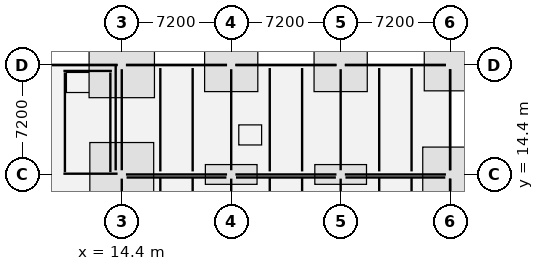
"""IFC4 building model, lengths in metres.
Left out: names, types, materials, properties, quantities, classifications, styles, units other than length and angle.
Written with IfcOpenShell. Run it as: python <this file> out.ifc"""

import sys

from ifc_helpers import new_model, si_unit, direction, frame, frame_2d, origin, origin_2d, place, context, subcontext, project, spatial, rectangle, extrude, element, fill, save


model = new_model("IFC4")
c1 = context("Model", 3, precision=1e-05, world=origin(), true_north=direction((0.0, 1.0)))
c2 = subcontext(c1, "Body", "Model", "MODEL_VIEW")
j1 = project(units=[si_unit("LENGTHUNIT", "METRE"), si_unit("PLANEANGLEUNIT", "RADIAN")], contexts=[c1])
p1 = place(None, origin())
s1 = spatial("IfcSite", under=j1, at=p1, CompositionType="ELEMENT")
p2 = place(p1, origin())
s2 = spatial("IfcBuilding", under=s1, at=p2, CompositionType="ELEMENT")
p3 = place(p2, origin())
s3 = spatial("IfcBuildingStorey", under=s2, at=p3, CompositionType="ELEMENT", Elevation=0.0)
for number, where, z_axis, x_axis in (
    (1, (14.4, 14.4, 0.0), (0.0, 0.0, 1.0), (1.0, 0.0, 0.0)),
    (2, (14.4, 21.6, 0.0), (0.0, 0.0, 1.0), (1.0, 0.0, 0.0)),
    (3, (21.6, 14.4, 0.0), (0.0, 0.0, 1.0), (1.0, 0.0, 0.0)),
    (4, (21.6, 21.6, 0.0), (0.0, 0.0, 1.0), (1.0, 0.0, 0.0)),
    (5, (28.8, 14.4, 0.0), (0.0, 0.0, 1.0), (1.0, 0.0, 0.0)),
    (6, (28.8, 21.6, 0.0), (0.0, 0.0, 1.0), (1.0, 0.0, 0.0)),
    (7, (36.0, 14.4, 0.0), (0.0, 0.0, 1.0), (1.0, 0.0, 0.0)),
    (8, (36.0, 21.6, 0.0), (0.0, 0.0, 1.0), (1.0, 0.0, 0.0)),
):
    element("IfcColumn", number, at=place(p3, frame(where, z_axis=z_axis, x_axis=x_axis)), inside=s3, PredefinedType="COLUMN", context=c2, shape_type="SweptSolid", body=[
        extrude(rectangle(XDim=0.55, YDim=0.55, at=origin_2d()), origin(), (0.0, 0.0, 1.0), 5.4),
    ])
p4 = place(p3, frame((10.56, 14.45, 0.0), z_axis=(0.0, 0.0, 1.0), x_axis=(1.0, 0.0, 0.0)))
e9 = element("IfcWall", 9, at=p4, inside=s3, PredefinedType="SHEAR", context=c2, shape_type="SweptSolid", body=[
    extrude(rectangle(XDim=3.565, YDim=0.2, at=frame_2d((1.782, 0.0))), origin(), (0.0, 0.0, 1.0), 5.15),
])
p5 = place(p4, frame((1.232, 0.0, 0.0)))
e10 = element("IfcOpeningElement", 10, at=p5, cuts=e9, PredefinedType="OPENING", context=c2, shape_type="SweptSolid", body=[
    extrude(rectangle(XDim=1.1, YDim=2.15, at=frame_2d((0.55, 1.075))), frame((0.0, 0.112, 0.0), z_axis=(0.0, -1.0, 0.0), x_axis=(1.0, 0.0, 0.0)), (0.0, 0.0, 1.0), 0.224),
])
p6 = place(p3, frame((10.56, 21.21, 0.0), z_axis=(0.0, 0.0, 1.0), x_axis=(1.0, 0.0, 0.0)))
e11 = element("IfcWall", 11, at=p6, inside=s3, PredefinedType="SHEAR", context=c2, shape_type="SweptSolid", body=[
    extrude(rectangle(XDim=3.19, YDim=0.2, at=frame_2d((1.595, 0.0))), origin(), (0.0, 0.0, 1.0), 5.15),
])
for number, where, z_axis, x_axis in (
    (12, (10.66, 14.55, 0.0), (0.0, 0.0, 1.0), (0.0, 1.0, 0.0)),
    (13, (13.65, 14.55, 0.0), (0.0, 0.0, 1.0), (0.0, 1.0, 0.0)),
):
    element("IfcWall", number, at=place(p3, frame(where, z_axis=z_axis, x_axis=x_axis)), inside=s3, PredefinedType="SHEAR", context=c2, shape_type="SweptSolid", body=[
        extrude(rectangle(XDim=6.56, YDim=0.2, at=frame_2d((3.28, 0.0))), origin(), (0.0, 0.0, 1.0), 5.15),
    ])
p7 = place(p3, frame((36.0, 14.675, 0.0), z_axis=(0.0, 0.0, 1.0), x_axis=(0.0, 1.0, 0.0)))
e14 = element("IfcWall", 14, at=p7, inside=s3, PredefinedType="SOLIDWALL", context=c2, shape_type="SweptSolid", body=[
    extrude(rectangle(XDim=6.65, YDim=0.36, at=frame_2d((3.325, 0.0))), origin(), (0.0, 0.0, 1.0), 4.49),
])
p8 = place(p7, frame((2.325, 0.0, 0.0)))
e15 = element("IfcOpeningElement", 15, at=p8, cuts=e14, PredefinedType="OPENING", context=c2, shape_type="SweptSolid", body=[
    extrude(rectangle(XDim=2.0, YDim=2.3, at=frame_2d((1.0, 1.15))), frame((0.0, 0.192, 0.0), z_axis=(0.0, -1.0, 0.0), x_axis=(1.0, 0.0, 0.0)), (0.0, 0.0, 1.0), 0.384),
])
p9 = place(p3, frame((35.725, 21.6, 0.0), z_axis=(0.0, 0.0, 1.0), x_axis=(-1.0, 0.0, 0.0)))
e16 = element("IfcWall", 16, at=p9, inside=s3, PredefinedType="SOLIDWALL", context=c2, shape_type="SweptSolid", body=[
    extrude(rectangle(XDim=6.65, YDim=0.36, at=frame_2d((3.325, 0.0))), origin(), (0.0, 0.0, 1.0), 4.39),
])
p10 = place(p9, frame((2.425, 0.0, 0.85)))
e17 = element("IfcOpeningElement", 17, at=p10, cuts=e16, PredefinedType="OPENING", context=c2, shape_type="SweptSolid", body=[
    extrude(rectangle(XDim=1.8, YDim=2.2, at=frame_2d((0.9, 1.1))), frame((0.0, 0.192, 0.0), z_axis=(0.0, -1.0, 0.0), x_axis=(1.0, 0.0, 0.0)), (0.0, 0.0, 1.0), 0.384),
])
p11 = place(p3, frame((28.525, 21.6, 0.0), z_axis=(0.0, 0.0, 1.0), x_axis=(-1.0, 0.0, 0.0)))
e18 = element("IfcWall", 18, at=p11, inside=s3, PredefinedType="SOLIDWALL", context=c2, shape_type="SweptSolid", body=[
    extrude(rectangle(XDim=6.65, YDim=0.36, at=frame_2d((3.325, 0.0))), origin(), (0.0, 0.0, 1.0), 4.44),
])
p12 = place(p11, frame((2.875, 0.0, 0.85)))
e19 = element("IfcOpeningElement", 19, at=p12, cuts=e18, PredefinedType="OPENING", context=c2, shape_type="SweptSolid", body=[
    extrude(rectangle(XDim=0.9, YDim=2.0, at=frame_2d((0.45, 1.0))), frame((0.0, 0.192, 0.0), z_axis=(0.0, -1.0, 0.0), x_axis=(1.0, 0.0, 0.0)), (0.0, 0.0, 1.0), 0.384),
])
p13 = place(p3, frame((21.325, 21.6, 0.0), z_axis=(0.0, 0.0, 1.0), x_axis=(-1.0, 0.0, 0.0)))
e20 = element("IfcWall", 20, at=p13, inside=s3, PredefinedType="SOLIDWALL", context=c2, shape_type="SweptSolid", body=[
    extrude(rectangle(XDim=6.65, YDim=0.36, at=frame_2d((3.325, 0.0))), origin(), (0.0, 0.0, 1.0), 4.39),
])
p14 = place(p13, frame((2.65, 0.0, 0.85)))
e21 = element("IfcOpeningElement", 21, at=p14, cuts=e20, PredefinedType="OPENING", context=c2, shape_type="SweptSolid", body=[
    extrude(rectangle(XDim=1.35, YDim=2.0, at=frame_2d((0.675, 1.0))), frame((0.0, 0.192, 0.0), z_axis=(0.0, -1.0, 0.0), x_axis=(1.0, 0.0, 0.0)), (0.0, 0.0, 1.0), 0.384),
])
p15 = place(p3, frame((11.0, 21.6, 0.0), z_axis=(0.0, 0.0, 1.0), x_axis=(-1.0, 0.0, 0.0)))
e22 = element("IfcWall", 22, at=p15, inside=s3, PredefinedType="SOLIDWALL", context=c2, shape_type="SweptSolid", body=[
    extrude(rectangle(XDim=0.4, YDim=0.36, at=frame_2d((0.2, 0.0))), origin(), (0.0, 0.0, 1.0), 4.44),
])
p16 = place(p3, frame((14.715, 14.2, 0.0), z_axis=(0.0, 0.0, 1.0), x_axis=(1.0, 0.0, 0.0)))
e23 = element("IfcWall", 23, at=p16, inside=s3, PredefinedType="PARTITIONING", context=c2, shape_type="SweptSolid", body=[
    extrude(rectangle(XDim=6.57, YDim=0.1, at=frame_2d((3.285, 0.0))), origin(), (0.0, 0.0, 1.0), 4.438),
])
p17 = place(p16, frame((2.535, 0.0, 0.0)))
e24 = element("IfcOpeningElement", 24, at=p17, cuts=e23, PredefinedType="OPENING", context=c2, shape_type="SweptSolid", body=[
    extrude(rectangle(XDim=1.5, YDim=2.2, at=frame_2d((0.75, 1.1))), frame((0.0, 0.062, 0.0), z_axis=(0.0, -1.0, 0.0), x_axis=(1.0, 0.0, 0.0)), (0.0, 0.0, 1.0), 0.124),
])
p18 = place(p3, frame((21.915, 14.2, 0.0), z_axis=(0.0, 0.0, 1.0), x_axis=(1.0, 0.0, 0.0)))
e25 = element("IfcWall", 25, at=p18, inside=s3, PredefinedType="PARTITIONING", context=c2, shape_type="SweptSolid", body=[
    extrude(rectangle(XDim=6.57, YDim=0.1, at=frame_2d((3.285, 0.0))), origin(), (0.0, 0.0, 1.0), 4.388),
])
p19 = place(p3, frame((29.115, 14.2, 0.0), z_axis=(0.0, 0.0, 1.0), x_axis=(1.0, 0.0, 0.0)))
e26 = element("IfcWall", 26, at=p19, inside=s3, PredefinedType="PARTITIONING", context=c2, shape_type="SweptSolid", body=[
    extrude(rectangle(XDim=6.57, YDim=0.1, at=frame_2d((3.285, 0.0))), origin(), (0.0, 0.0, 1.0), 4.438),
])
p20 = place(p3, frame((14.0, 14.67, 0.0), z_axis=(0.0, 0.0, 1.0), x_axis=(0.0, 1.0, 0.0)))
e27 = element("IfcWall", 27, at=p20, inside=s3, PredefinedType="PARTITIONING", context=c2, shape_type="SweptSolid", body=[
    extrude(rectangle(XDim=6.93, YDim=0.1, at=frame_2d((3.465, 0.0))), origin(), (0.0, 0.0, 1.0), 4.438),
])
p21 = place(p8, frame((2.0, 0.0, 0.0), z_axis=(0.0, 0.0, 1.0), x_axis=(-1.0, 0.0, 0.0)))
e28 = element("IfcDoor", 28, at=p21, inside=s3, OperationType="DOUBLE_SWING_LEFT", PredefinedType="DOOR", context=c2, shape_type="SweptSolid", body=[
    extrude(rectangle(XDim=2.0, YDim=2.3, at=frame_2d((1.0, 1.15))), frame((0.0, 0.025, 0.0), z_axis=(0.0, -1.0, 0.0), x_axis=(1.0, 0.0, 0.0)), (0.0, 0.0, 1.0), 0.05),
])
fill(e15, e28)
p22 = place(p10, origin())
e29 = element("IfcWindow", 29, at=p22, inside=s3, PartitioningType="SINGLE_PANEL", PredefinedType="WINDOW", context=c2, shape_type="SweptSolid", body=[
    extrude(rectangle(XDim=1.8, YDim=2.2, at=frame_2d((0.9, 1.1))), frame((0.0, 0.03, 0.0), z_axis=(0.0, -1.0, 0.0), x_axis=(1.0, 0.0, 0.0)), (0.0, 0.0, 1.0), 0.06),
])
fill(e17, e29)
p23 = place(p12, origin())
e30 = element("IfcWindow", 30, at=p23, inside=s3, PartitioningType="SINGLE_PANEL", PredefinedType="WINDOW", context=c2, shape_type="SweptSolid", body=[
    extrude(rectangle(XDim=0.9, YDim=2.0, at=frame_2d((0.45, 1.0))), frame((0.0, 0.03, 0.0), z_axis=(0.0, -1.0, 0.0), x_axis=(1.0, 0.0, 0.0)), (0.0, 0.0, 1.0), 0.06),
])
fill(e19, e30)
p24 = place(p14, origin())
e31 = element("IfcWindow", 31, at=p24, inside=s3, PartitioningType="SINGLE_PANEL", PredefinedType="WINDOW", context=c2, shape_type="SweptSolid", body=[
    extrude(rectangle(XDim=1.35, YDim=2.0, at=frame_2d((0.675, 1.0))), frame((0.0, 0.03, 0.0), z_axis=(0.0, -1.0, 0.0), x_axis=(1.0, 0.0, 0.0)), (0.0, 0.0, 1.0), 0.06),
])
fill(e21, e31)
p25 = place(p5, frame((1.1, 0.0, 0.0), z_axis=(0.0, 0.0, 1.0), x_axis=(-1.0, 0.0, 0.0)))
e32 = element("IfcDoor", 32, at=p25, inside=s3, OperationType="SINGLE_SWING_RIGHT", PredefinedType="DOOR", context=c2, shape_type="SweptSolid", body=[
    extrude(rectangle(XDim=1.1, YDim=2.15, at=frame_2d((0.55, 1.075))), frame((0.0, 0.025, 0.0), z_axis=(0.0, -1.0, 0.0), x_axis=(1.0, 0.0, 0.0)), (0.0, 0.0, 1.0), 0.05),
])
fill(e10, e32)
p26 = place(p17, origin())
e33 = element("IfcDoor", 33, at=p26, inside=s3, OperationType="DOUBLE_SWING_LEFT", PredefinedType="DOOR", context=c2, shape_type="SweptSolid", body=[
    extrude(rectangle(XDim=1.5, YDim=2.2, at=frame_2d((0.75, 1.1))), frame((0.0, 0.025, 0.0), z_axis=(0.0, -1.0, 0.0), x_axis=(1.0, 0.0, 0.0)), (0.0, 0.0, 1.0), 0.05),
])
fill(e24, e33)
save(model, sys.argv[1])
